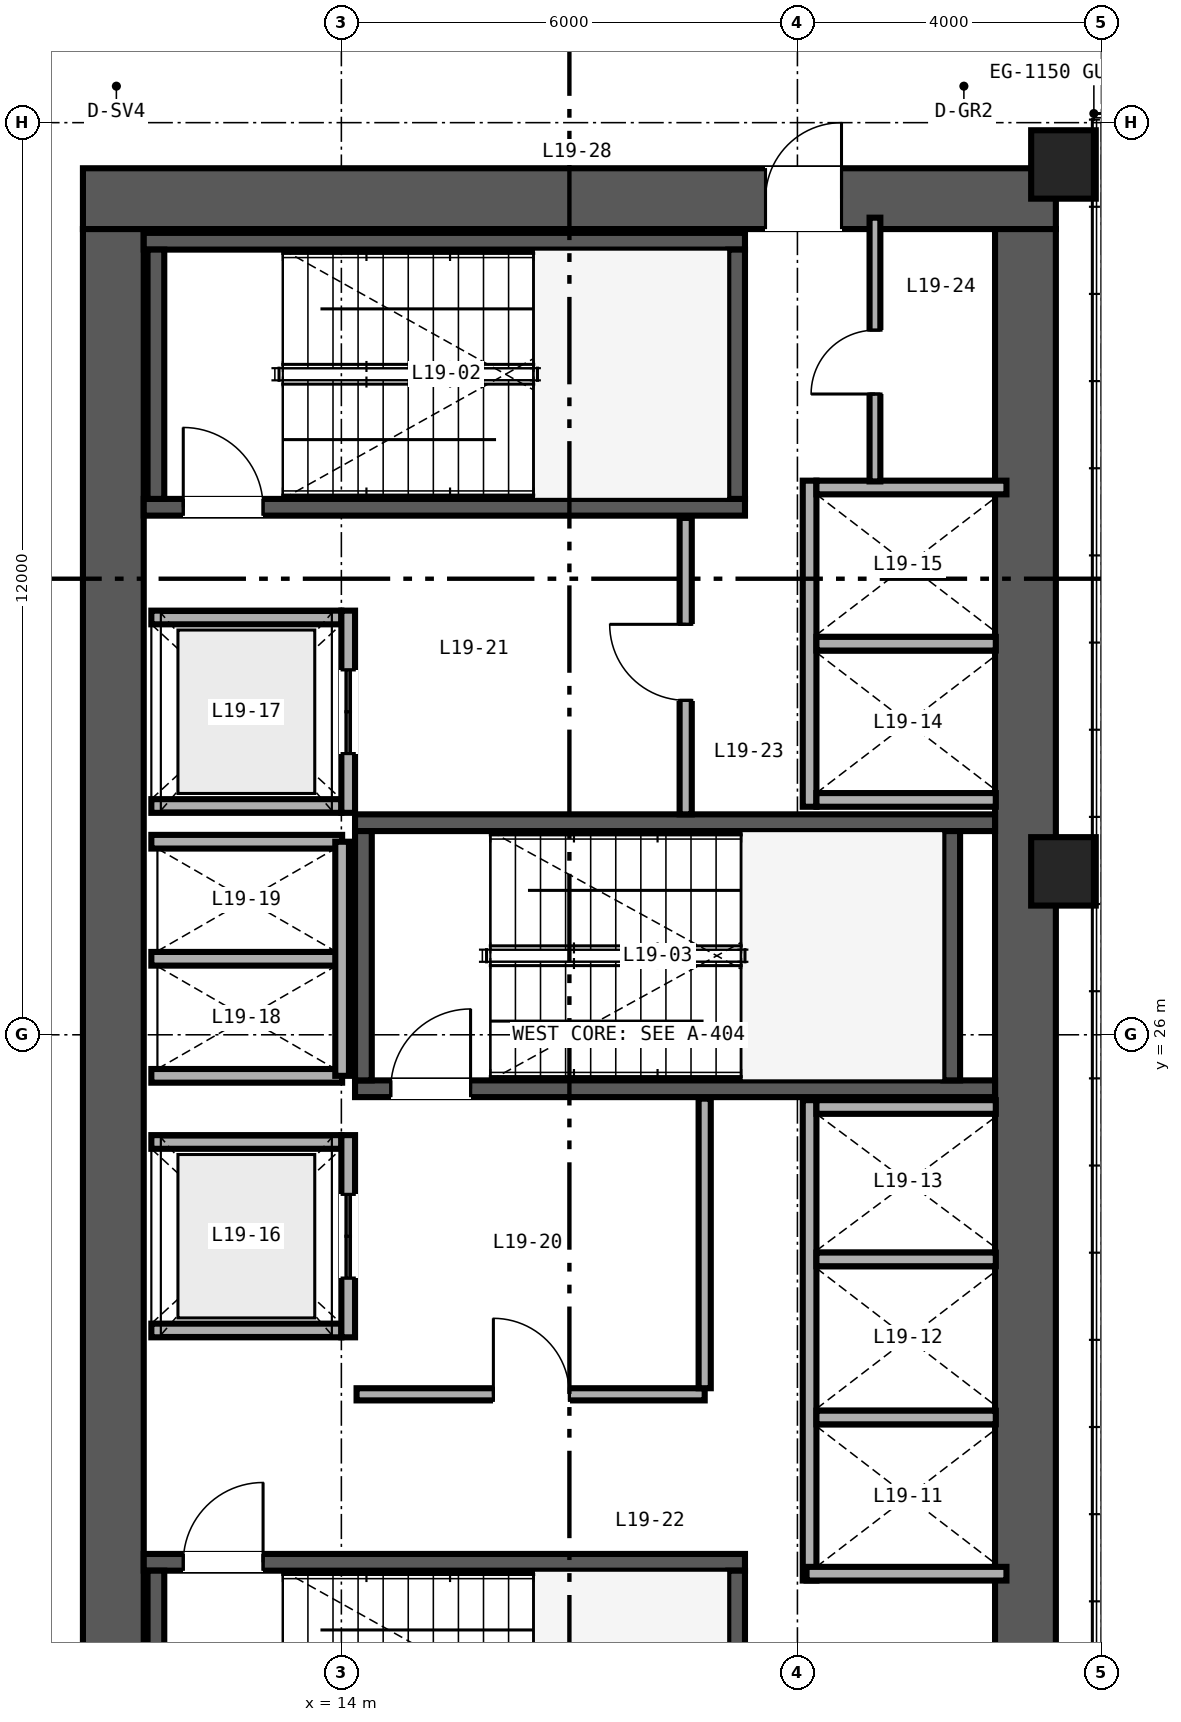
"""IFC4 building model, lengths in metres.
Left out: names, types, materials, properties, quantities, classifications, styles, units other than length and angle.
Written with IfcOpenShell. Run it as: python <this file> out.ifc"""

import sys

from ifc_helpers import new_model, si_unit, direction, frame, frame_2d, origin, origin_2d, place, context, subcontext, project, spatial, rectangle, hollow_rectangle, extrude, source, transform, mapped, element, fill, save


model = new_model("IFC4")
c1 = context("Model", 3, precision=1e-05, world=origin(), true_north=direction((0.0, 1.0)))
c2 = subcontext(c1, "Body", "Model", "MODEL_VIEW")
j1 = project(units=[si_unit("LENGTHUNIT", "METRE"), si_unit("PLANEANGLEUNIT", "RADIAN")], contexts=[c1])
p1 = place(None, origin())
s1 = spatial("IfcSite", under=j1, at=p1, CompositionType="ELEMENT")
p2 = place(p1, origin())
s2 = spatial("IfcBuilding", under=s1, at=p2, CompositionType="ELEMENT")
p3 = place(p2, frame((0.0, 0.0, 78.0)))
s3 = spatial("IfcBuildingStorey", under=s2, at=p3, CompositionType="ELEMENT", Elevation=78.0)
p4 = place(p3, frame((10.6, 37.0, 0.0), z_axis=(0.0, 0.0, 1.0), x_axis=(1.0, 0.0, 0.0)))
e1 = element("IfcWall", 1, at=p4, inside=s3, PredefinedType="SHEAR", context=c2, shape_type="SweptSolid", body=[
    extrude(rectangle(XDim=12.8, YDim=0.8, at=frame_2d((6.4, 0.0))), origin(), (0.0, 0.0, 1.0), 3.35),
])
p5 = place(p4, frame((8.98, 0.0, 0.0)))
e2 = element("IfcOpeningElement", 2, at=p5, cuts=e1, PredefinedType="OPENING", context=c2, shape_type="SweptSolid", body=[
    extrude(rectangle(XDim=1.0, YDim=2.15, at=frame_2d((0.5, 1.075))), frame((0.0, 0.41, 0.0), z_axis=(0.0, -1.0, 0.0), x_axis=(1.0, 0.0, 0.0)), (0.0, 0.0, 1.0), 0.82),
])
for number, where, z_axis, x_axis in (
    (3, (11.0, 15.4, 0.0), (0.0, 0.0, 1.0), (0.0, 1.0, 0.0)),
    (4, (23.0, 15.4, 0.0), (0.0, 0.0, 1.0), (0.0, 1.0, 0.0)),
):
    element("IfcWall", number, at=place(p3, frame(where, z_axis=z_axis, x_axis=x_axis)), inside=s3, PredefinedType="SHEAR", context=c2, shape_type="SweptSolid", body=[
        extrude(rectangle(XDim=21.2, YDim=0.8, at=frame_2d((10.6, 0.0))), origin(), (0.0, 0.0, 1.0), 3.35),
    ])
p6 = place(p3, frame((11.4, 19.06, 0.0), z_axis=(0.0, 0.0, 1.0), x_axis=(1.0, 0.0, 0.0)))
e5 = element("IfcWall", 5, at=p6, inside=s3, PredefinedType="SHEAR", context=c2, shape_type="SweptSolid", body=[
    extrude(rectangle(XDim=7.91, YDim=0.22, at=frame_2d((3.955, 0.0))), origin(), (0.0, 0.0, 1.0), 3.4),
])
p7 = place(p6, frame((0.52, 0.0, 0.0)))
e6 = element("IfcOpeningElement", 6, at=p7, cuts=e5, PredefinedType="OPENING", context=c2, shape_type="SweptSolid", body=[
    extrude(rectangle(XDim=1.05, YDim=2.15, at=frame_2d((0.525, 1.075))), frame((0.0, 0.12, 0.0), z_axis=(0.0, -1.0, 0.0), x_axis=(1.0, 0.0, 0.0)), (0.0, 0.0, 1.0), 0.24),
])
for number, where, z_axis, x_axis in (
    (7, (11.56, 15.67, 0.0), (0.0, 0.0, 1.0), (0.0, 1.0, 0.0)),
    (8, (19.2, 15.67, 0.0), (0.0, 0.0, 1.0), (0.0, 1.0, 0.0)),
):
    element("IfcWall", number, at=place(p3, frame(where, z_axis=z_axis, x_axis=x_axis)), inside=s3, PredefinedType="SHEAR", context=c2, shape_type="SweptSolid", body=[
        extrude(rectangle(XDim=3.28, YDim=0.22, at=frame_2d((1.64, 0.0))), origin(), (0.0, 0.0, 1.0), 3.4),
    ])
p8 = place(p3, frame((11.4, 32.94, 0.0), z_axis=(0.0, 0.0, 1.0), x_axis=(1.0, 0.0, 0.0)))
e9 = element("IfcWall", 9, at=p8, inside=s3, PredefinedType="SHEAR", context=c2, shape_type="SweptSolid", body=[
    extrude(rectangle(XDim=7.91, YDim=0.22, at=frame_2d((3.955, 0.0))), origin(), (0.0, 0.0, 1.0), 3.4),
])
p9 = place(p8, frame((0.52, 0.0, 0.0)))
e10 = element("IfcOpeningElement", 10, at=p9, cuts=e9, PredefinedType="OPENING", context=c2, shape_type="SweptSolid", body=[
    extrude(rectangle(XDim=1.05, YDim=2.15, at=frame_2d((0.525, 1.075))), frame((0.0, 0.12, 0.0), z_axis=(0.0, -1.0, 0.0), x_axis=(1.0, 0.0, 0.0)), (0.0, 0.0, 1.0), 0.24),
])
p10 = place(p3, frame((11.4, 36.44, 0.0), z_axis=(0.0, 0.0, 1.0), x_axis=(1.0, 0.0, 0.0)))
e11 = element("IfcWall", 11, at=p10, inside=s3, PredefinedType="SHEAR", context=c2, shape_type="SweptSolid", body=[
    extrude(rectangle(XDim=7.91, YDim=0.22, at=frame_2d((3.955, 0.0))), origin(), (0.0, 0.0, 1.0), 3.4),
])
for number, where, z_axis, x_axis in (
    (12, (11.56, 33.05, 0.0), (0.0, 0.0, 1.0), (0.0, 1.0, 0.0)),
    (13, (19.2, 33.05, 0.0), (0.0, 0.0, 1.0), (0.0, 1.0, 0.0)),
):
    element("IfcWall", number, at=place(p3, frame(where, z_axis=z_axis, x_axis=x_axis)), inside=s3, PredefinedType="SHEAR", context=c2, shape_type="SweptSolid", body=[
        extrude(rectangle(XDim=3.28, YDim=0.22, at=frame_2d((1.64, 0.0))), origin(), (0.0, 0.0, 1.0), 3.4),
    ])
p11 = place(p3, frame((14.18, 25.29, 0.0), z_axis=(0.0, 0.0, 1.0), x_axis=(1.0, 0.0, 0.0)))
e14 = element("IfcWall", 14, at=p11, inside=s3, PredefinedType="SHEAR", context=c2, shape_type="SweptSolid", body=[
    extrude(rectangle(XDim=8.42, YDim=0.22, at=frame_2d((4.21, 0.0))), origin(), (0.0, 0.0, 1.0), 3.4),
])
p12 = place(p11, frame((0.47, 0.0, 0.0)))
e15 = element("IfcOpeningElement", 15, at=p12, cuts=e14, PredefinedType="OPENING", context=c2, shape_type="SweptSolid", body=[
    extrude(rectangle(XDim=1.05, YDim=2.15, at=frame_2d((0.525, 1.075))), frame((0.0, 0.12, 0.0), z_axis=(0.0, -1.0, 0.0), x_axis=(1.0, 0.0, 0.0)), (0.0, 0.0, 1.0), 0.24),
])
p13 = place(p3, frame((14.18, 28.79, 0.0), z_axis=(0.0, 0.0, 1.0), x_axis=(1.0, 0.0, 0.0)))
e16 = element("IfcWall", 16, at=p13, inside=s3, PredefinedType="SHEAR", context=c2, shape_type="SweptSolid", body=[
    extrude(rectangle(XDim=8.42, YDim=0.22, at=frame_2d((4.21, 0.0))), origin(), (0.0, 0.0, 1.0), 3.4),
])
for number, where, z_axis, x_axis in (
    (17, (14.29, 25.4, 0.0), (0.0, 0.0, 1.0), (0.0, 1.0, 0.0)),
    (18, (22.03, 25.4, 0.0), (0.0, 0.0, 1.0), (0.0, 1.0, 0.0)),
):
    element("IfcWall", number, at=place(p3, frame(where, z_axis=z_axis, x_axis=x_axis)), inside=s3, PredefinedType="SHEAR", context=c2, shape_type="SweptSolid", body=[
        extrude(rectangle(XDim=3.28, YDim=0.22, at=frame_2d((1.64, 0.0))), origin(), (0.0, 0.0, 1.0), 3.4),
    ])
m1 = source(origin(), c2, "Body", "SweptSolid", [
    extrude(hollow_rectangle(XDim=0.85, YDim=0.9, WallThickness=0.04, at=origin_2d()), origin(), (0.0, 0.0, 1.0), 3.35),
])
for number, where, z_axis, x_axis in (
    (19, (23.5, 28.15, 0.0), (0.0, 0.0, 1.0), (1.0, 0.0, 0.0)),
    (20, (23.5, 37.45, 0.0), (0.0, 0.0, 1.0), (1.0, 0.0, 0.0)),
):
    element("IfcColumn", number, at=place(p3, frame(where, z_axis=z_axis, x_axis=x_axis)), inside=s3, PredefinedType="COLUMN", context=c2, shape_type="MappedRepresentation", body=[
        mapped(m1, transform((0.0, 0.0, 0.0), scale=1.0)),
    ])
p14 = place(p3, frame((20.16, 18.82, 0.0), z_axis=(0.0, 0.0, 1.0), x_axis=(0.0, 1.0, 0.0)))
e21 = element("IfcWall", 21, at=p14, inside=s3, PredefinedType="SOLIDWALL", context=c2, shape_type="SweptSolid", body=[
    extrude(rectangle(XDim=6.32, YDim=0.18, at=frame_2d((3.16, 0.0))), origin(), (0.0, 0.0, 1.0), 2.36),
])
p15 = place(p3, frame((20.12, 18.91, 0.0), z_axis=(0.0, 0.0, 1.0), x_axis=(1.0, 0.0, 0.0)))
e22 = element("IfcWall", 22, at=p15, inside=s3, PredefinedType="SOLIDWALL", context=c2, shape_type="SweptSolid", body=[
    extrude(rectangle(XDim=2.63, YDim=0.18, at=frame_2d((1.315, 0.0))), origin(), (0.0, 0.0, 1.0), 3.35),
])
p16 = place(p3, frame((20.25, 25.05, 0.0), z_axis=(0.0, 0.0, 1.0), x_axis=(1.0, 0.0, 0.0)))
e23 = element("IfcWall", 23, at=p16, inside=s3, PredefinedType="SOLIDWALL", context=c2, shape_type="SweptSolid", body=[
    extrude(rectangle(XDim=2.36, YDim=0.18, at=frame_2d((1.18, 0.0))), origin(), (0.0, 0.0, 1.0), 3.35),
])
p17 = place(p3, frame((20.25, 20.965, 0.0), z_axis=(0.0, 0.0, 1.0), x_axis=(1.0, 0.0, 0.0)))
e24 = element("IfcWall", 24, at=p17, inside=s3, PredefinedType="SOLIDWALL", context=c2, shape_type="SweptSolid", body=[
    extrude(rectangle(XDim=2.36, YDim=0.18, at=frame_2d((1.18, 0.0))), origin(), (0.0, 0.0, 1.0), 2.36),
])
p18 = place(p3, frame((20.25, 23.045, 0.0), z_axis=(0.0, 0.0, 1.0), x_axis=(1.0, 0.0, 0.0)))
e25 = element("IfcWall", 25, at=p18, inside=s3, PredefinedType="SOLIDWALL", context=c2, shape_type="SweptSolid", body=[
    extrude(rectangle(XDim=2.36, YDim=0.18, at=frame_2d((1.18, 0.0))), origin(), (0.0, 0.0, 1.0), 3.35),
])
p19 = place(p3, frame((20.16, 29.0, 0.0), z_axis=(0.0, 0.0, 1.0), x_axis=(0.0, 1.0, 0.0)))
e26 = element("IfcWall", 26, at=p19, inside=s3, PredefinedType="SOLIDWALL", context=c2, shape_type="SweptSolid", body=[
    extrude(rectangle(XDim=4.29, YDim=0.18, at=frame_2d((2.145, 0.0))), origin(), (0.0, 0.0, 1.0), 3.35),
])
p20 = place(p3, frame((20.25, 29.09, 0.0), z_axis=(0.0, 0.0, 1.0), x_axis=(1.0, 0.0, 0.0)))
e27 = element("IfcWall", 27, at=p20, inside=s3, PredefinedType="SOLIDWALL", context=c2, shape_type="SweptSolid", body=[
    extrude(rectangle(XDim=2.36, YDim=0.18, at=frame_2d((1.18, 0.0))), origin(), (0.0, 0.0, 1.0), 3.35),
])
p21 = place(p3, frame((20.25, 33.2, 0.0), z_axis=(0.0, 0.0, 1.0), x_axis=(1.0, 0.0, 0.0)))
e28 = element("IfcWall", 28, at=p21, inside=s3, PredefinedType="SOLIDWALL", context=c2, shape_type="SweptSolid", body=[
    extrude(rectangle(XDim=2.5, YDim=0.18, at=frame_2d((1.25, 0.0))), origin(), (0.0, 0.0, 1.0), 3.35),
])
p22 = place(p3, frame((20.25, 31.145, 0.0), z_axis=(0.0, 0.0, 1.0), x_axis=(1.0, 0.0, 0.0)))
e29 = element("IfcWall", 29, at=p22, inside=s3, PredefinedType="SOLIDWALL", context=c2, shape_type="SweptSolid", body=[
    extrude(rectangle(XDim=2.36, YDim=0.18, at=frame_2d((1.18, 0.0))), origin(), (0.0, 0.0, 1.0), 3.35),
])
for number, where, z_axis, x_axis in (
    (30, (11.5, 22.11, 0.0), (0.0, 0.0, 1.0), (1.0, 0.0, 0.0)),
    (31, (11.5, 24.59, 0.0), (0.0, 0.0, 1.0), (1.0, 0.0, 0.0)),
):
    element("IfcWall", number, at=place(p3, frame(where, z_axis=z_axis, x_axis=x_axis)), inside=s3, PredefinedType="SOLIDWALL", context=c2, shape_type="SweptSolid", body=[
        extrude(rectangle(XDim=2.5, YDim=0.18, at=frame_2d((1.25, 0.0))), origin(), (0.0, 0.0, 1.0), 3.35),
    ])
p23 = place(p3, frame((14.09, 22.02, 0.0), z_axis=(0.0, 0.0, 1.0), x_axis=(0.0, 1.0, 0.0)))
e32 = element("IfcWall", 32, at=p23, inside=s3, PredefinedType="SOLIDWALL", context=c2, shape_type="SweptSolid", body=[
    extrude(rectangle(XDim=2.66, YDim=0.18, at=frame_2d((1.33, 0.0))), origin(), (0.0, 0.0, 1.0), 3.35),
])
p24 = place(p23, frame((0.78, 0.0, 0.0)))
e33 = element("IfcOpeningElement", 33, at=p24, cuts=e32, PredefinedType="OPENING", context=c2, shape_type="SweptSolid", body=[
    extrude(rectangle(XDim=1.1, YDim=2.2, at=frame_2d((0.55, 1.1))), frame((0.0, 0.1, 0.0), z_axis=(0.0, -1.0, 0.0), x_axis=(1.0, 0.0, 0.0)), (0.0, 0.0, 1.0), 0.2),
])
for number, where, z_axis, x_axis in (
    (34, (11.5, 29.01, 0.0), (0.0, 0.0, 1.0), (1.0, 0.0, 0.0)),
    (35, (11.5, 31.49, 0.0), (0.0, 0.0, 1.0), (1.0, 0.0, 0.0)),
):
    element("IfcWall", number, at=place(p3, frame(where, z_axis=z_axis, x_axis=x_axis)), inside=s3, PredefinedType="SOLIDWALL", context=c2, shape_type="SweptSolid", body=[
        extrude(rectangle(XDim=2.5, YDim=0.18, at=frame_2d((1.25, 0.0))), origin(), (0.0, 0.0, 1.0), 3.35),
    ])
p25 = place(p3, frame((14.09, 28.92, 0.0), z_axis=(0.0, 0.0, 1.0), x_axis=(0.0, 1.0, 0.0)))
e36 = element("IfcWall", 36, at=p25, inside=s3, PredefinedType="SOLIDWALL", context=c2, shape_type="SweptSolid", body=[
    extrude(rectangle(XDim=2.66, YDim=0.18, at=frame_2d((1.33, 0.0))), origin(), (0.0, 0.0, 1.0), 3.35),
])
p26 = place(p25, frame((0.78, 0.0, 0.0)))
e37 = element("IfcOpeningElement", 37, at=p26, cuts=e36, PredefinedType="OPENING", context=c2, shape_type="SweptSolid", body=[
    extrude(rectangle(XDim=1.1, YDim=2.2, at=frame_2d((0.55, 1.1))), frame((0.0, 0.1, 0.0), z_axis=(0.0, -1.0, 0.0), x_axis=(1.0, 0.0, 0.0)), (0.0, 0.0, 1.0), 0.2),
])
for number, where, z_axis, x_axis in (
    (38, (11.5, 25.46, 0.0), (0.0, 0.0, 1.0), (1.0, 0.0, 0.0)),
    (39, (11.5, 27.0, 0.0), (0.0, 0.0, 1.0), (1.0, 0.0, 0.0)),
    (40, (11.5, 28.54, 0.0), (0.0, 0.0, 1.0), (1.0, 0.0, 0.0)),
):
    element("IfcWall", number, at=place(p3, frame(where, z_axis=z_axis, x_axis=x_axis)), inside=s3, PredefinedType="SOLIDWALL", context=c2, shape_type="SweptSolid", body=[
        extrude(rectangle(XDim=2.51, YDim=0.18, at=frame_2d((1.255, 0.0))), origin(), (0.0, 0.0, 1.0), 3.35),
    ])
p27 = place(p3, frame((14.01, 25.46, 0.0), z_axis=(0.0, 0.0, 1.0), x_axis=(0.0, 1.0, 0.0)))
e41 = element("IfcWall", 41, at=p27, inside=s3, PredefinedType="SOLIDWALL", context=c2, shape_type="SweptSolid", body=[
    extrude(rectangle(XDim=3.08, YDim=0.18, at=frame_2d((1.54, 0.0))), origin(), (0.0, 0.0, 1.0), 3.35),
])
p28 = place(p3, frame((14.2, 21.27, 0.0), z_axis=(0.0, 0.0, 1.0), x_axis=(1.0, 0.0, 0.0)))
e42 = element("IfcWall", 42, at=p28, inside=s3, PredefinedType="PARTITIONING", context=c2, shape_type="SweptSolid", body=[
    extrude(rectangle(XDim=4.58, YDim=0.16, at=frame_2d((2.29, 0.0))), origin(), (0.0, 0.0, 1.0), 3.35),
])
p29 = place(p28, frame((1.8, 0.0, 0.0)))
e43 = element("IfcOpeningElement", 43, at=p29, cuts=e42, PredefinedType="OPENING", context=c2, shape_type="SweptSolid", body=[
    extrude(rectangle(XDim=1.0, YDim=2.15, at=frame_2d((0.5, 1.075))), frame((0.0, 0.09, 0.0), z_axis=(0.0, -1.0, 0.0), x_axis=(1.0, 0.0, 0.0)), (0.0, 0.0, 1.0), 0.18),
])
p30 = place(p3, frame((18.78, 21.35, 0.0), z_axis=(0.0, 0.0, 1.0), x_axis=(0.0, 1.0, 0.0)))
e44 = element("IfcWall", 44, at=p30, inside=s3, PredefinedType="PARTITIONING", context=c2, shape_type="SweptSolid", body=[
    extrude(rectangle(XDim=3.81, YDim=0.16, at=frame_2d((1.905, 0.0))), origin(), (0.0, 0.0, 1.0), 3.35),
])
p31 = place(p3, frame((18.53, 28.9, 0.0), z_axis=(0.0, 0.0, 1.0), x_axis=(0.0, 1.0, 0.0)))
e45 = element("IfcWall", 45, at=p31, inside=s3, PredefinedType="PARTITIONING", context=c2, shape_type="SweptSolid", body=[
    extrude(rectangle(XDim=3.9, YDim=0.16, at=frame_2d((1.95, 0.0))), origin(), (0.0, 0.0, 1.0), 3.35),
])
p32 = place(p31, frame((1.5, 0.0, 0.0)))
e46 = element("IfcOpeningElement", 46, at=p32, cuts=e45, PredefinedType="OPENING", context=c2, shape_type="SweptSolid", body=[
    extrude(rectangle(XDim=1.0, YDim=2.15, at=frame_2d((0.5, 1.075))), frame((0.0, 0.09, 0.0), z_axis=(0.0, -1.0, 0.0), x_axis=(1.0, 0.0, 0.0)), (0.0, 0.0, 1.0), 0.18),
])
p33 = place(p3, frame((21.02, 33.28, 0.0), z_axis=(0.0, 0.0, 1.0), x_axis=(0.0, 1.0, 0.0)))
e47 = element("IfcWall", 47, at=p33, inside=s3, PredefinedType="PARTITIONING", context=c2, shape_type="SweptSolid", body=[
    extrude(rectangle(XDim=3.47, YDim=0.142, at=frame_2d((1.735, 0.0))), origin(), (0.0, 0.0, 1.0), 3.35),
])
p34 = place(p33, frame((1.15, 0.0, 0.0)))
e48 = element("IfcOpeningElement", 48, at=p34, cuts=e47, PredefinedType="OPENING", context=c2, shape_type="SweptSolid", body=[
    extrude(rectangle(XDim=0.84, YDim=2.1, at=frame_2d((0.42, 1.05))), frame((0.0, 0.081, 0.0), z_axis=(0.0, -1.0, 0.0), x_axis=(1.0, 0.0, 0.0)), (0.0, 0.0, 1.0), 0.162),
])
m2 = source(origin(), c2, "Body", "SweptSolid", [
    extrude(rectangle(XDim=1.05, YDim=2.15, at=frame_2d((0.525, 1.075))), frame((0.0, 0.025, 0.0), z_axis=(0.0, -1.0, 0.0), x_axis=(1.0, 0.0, 0.0)), (0.0, 0.0, 1.0), 0.05),
])
p35 = place(p7, origin())
e49 = element("IfcDoor", 49, at=p35, inside=s3, OperationType="SINGLE_SWING_RIGHT", PredefinedType="DOOR", context=c2, shape_type="MappedRepresentation", body=[
    mapped(m2, transform((0.0, 0.0, 0.0), scale=1.0)),
])
fill(e6, e49)
p36 = place(p9, origin())
e50 = element("IfcDoor", 50, at=p36, inside=s3, OperationType="SINGLE_SWING_LEFT", PredefinedType="DOOR", context=c2, shape_type="MappedRepresentation", body=[
    mapped(m2, transform((0.0, 0.0, 0.0), scale=1.0)),
])
fill(e10, e50)
p37 = place(p12, origin())
e51 = element("IfcDoor", 51, at=p37, inside=s3, OperationType="SINGLE_SWING_RIGHT", PredefinedType="DOOR", context=c2, shape_type="MappedRepresentation", body=[
    mapped(m2, transform((0.0, 0.0, 0.0), scale=1.0)),
])
fill(e15, e51)
m3 = source(origin(), c2, "Body", "SweptSolid", [
    extrude(rectangle(XDim=1.1, YDim=2.2, at=frame_2d((0.55, 1.1))), frame((0.0, 0.025, 0.0), z_axis=(0.0, -1.0, 0.0), x_axis=(1.0, 0.0, 0.0)), (0.0, 0.0, 1.0), 0.05),
])
p38 = place(p24, origin())
e52 = element("IfcDoor", 52, at=p38, inside=s3, OperationType="DOUBLE_DOOR_SLIDING", PredefinedType="DOOR", context=c2, shape_type="MappedRepresentation", body=[
    mapped(m3, transform((0.0, 0.0, 0.0), scale=1.0)),
])
fill(e33, e52)
p39 = place(p26, origin())
e53 = element("IfcDoor", 53, at=p39, inside=s3, OperationType="DOUBLE_DOOR_SLIDING", PredefinedType="DOOR", context=c2, shape_type="MappedRepresentation", body=[
    mapped(m3, transform((0.0, 0.0, 0.0), scale=1.0)),
])
fill(e37, e53)
m4 = source(origin(), c2, "Body", "SweptSolid", [
    extrude(rectangle(XDim=1.0, YDim=2.15, at=frame_2d((0.5, 1.075))), frame((0.0, 0.025, 0.0), z_axis=(0.0, -1.0, 0.0), x_axis=(1.0, 0.0, 0.0)), (0.0, 0.0, 1.0), 0.05),
])
p40 = place(p29, origin())
e54 = element("IfcDoor", 54, at=p40, inside=s3, OperationType="SINGLE_SWING_LEFT", PredefinedType="DOOR", context=c2, shape_type="MappedRepresentation", body=[
    mapped(m4, transform((0.0, 0.0, 0.0), scale=1.0)),
])
fill(e43, e54)
p41 = place(p32, origin())
e55 = element("IfcDoor", 55, at=p41, inside=s3, OperationType="SINGLE_SWING_RIGHT", PredefinedType="DOOR", context=c2, shape_type="MappedRepresentation", body=[
    mapped(m4, transform((0.0, 0.0, 0.0), scale=1.0)),
])
fill(e46, e55)
m5 = source(origin(), c2, "Body", "SweptSolid", [
    extrude(rectangle(XDim=0.84, YDim=2.1, at=frame_2d((0.42, 1.05))), frame((0.0, 0.025, 0.0), z_axis=(0.0, -1.0, 0.0), x_axis=(1.0, 0.0, 0.0)), (0.0, 0.0, 1.0), 0.05),
])
p42 = place(p34, origin())
e56 = element("IfcDoor", 56, at=p42, inside=s3, OperationType="SINGLE_SWING_LEFT", PredefinedType="DOOR", context=c2, shape_type="MappedRepresentation", body=[
    mapped(m5, transform((0.0, 0.0, 0.0), scale=1.0)),
])
fill(e48, e56)
p43 = place(p5, origin())
e57 = element("IfcDoor", 57, at=p43, inside=s3, OperationType="SINGLE_SWING_RIGHT", PredefinedType="DOOR", context=c2, shape_type="MappedRepresentation", body=[
    mapped(m4, transform((0.0, 0.0, 0.0), scale=1.0)),
])
fill(e2, e57)
save(model, sys.argv[1])
